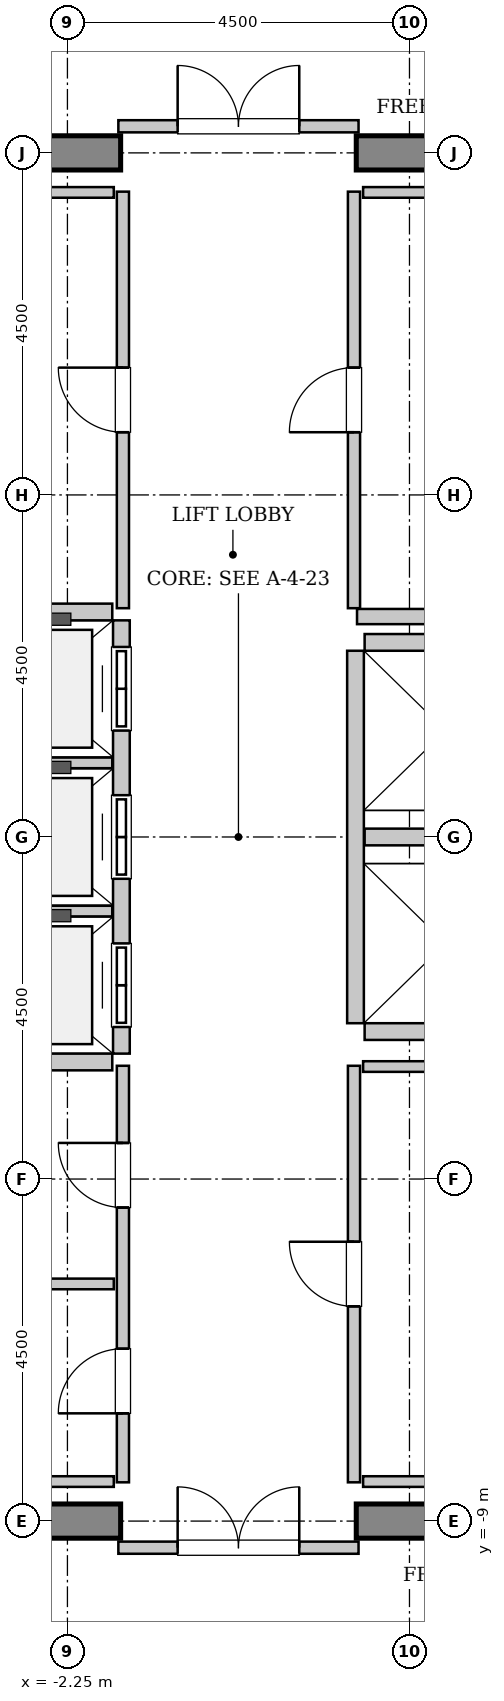
"""IFC4 building model, lengths in metres.
Left out: names, types, materials, properties, quantities, classifications, styles, units other than length and angle.
Written with IfcOpenShell. Run it as: python <this file> out.ifc"""

import sys

from ifc_helpers import new_model, si_unit, direction, frame, frame_2d, origin, place, context, subcontext, project, spatial, rectangle, extrude, source, transform, mapped, element, fill, save


model = new_model("IFC4")
c1 = context("Model", 3, precision=1e-05, world=origin(), true_north=direction((0.0, 1.0)))
c2 = subcontext(c1, "Body", "Model", "MODEL_VIEW")
j1 = project(units=[si_unit("LENGTHUNIT", "METRE"), si_unit("PLANEANGLEUNIT", "RADIAN")], contexts=[c1])
p1 = place(None, origin())
s1 = spatial("IfcSite", under=j1, at=p1, CompositionType="ELEMENT")
p2 = place(p1, origin())
s2 = spatial("IfcBuilding", under=s1, at=p2, CompositionType="ELEMENT")
p3 = place(p2, frame((0.0, 0.0, 276.0)))
s3 = spatial("IfcBuildingStorey", under=s2, at=p3, CompositionType="ELEMENT", Elevation=276.0)
m1 = source(origin(), c2, "Body", "SweptSolid", [
    extrude(rectangle(XDim=9.925, YDim=0.45, at=frame_2d((4.962, 0.0))), origin(), (0.0, 0.0, 1.0), 3.8),
])
for number, where, z_axis, x_axis in (
    (1, (-11.475, 9.0, 0.0), (0.0, 0.0, 1.0), (1.0, 0.0, 0.0)),
    (2, (1.55, 9.0, 0.0), (0.0, 0.0, 1.0), (1.0, 0.0, 0.0)),
    (3, (-11.475, -9.0, 0.0), (0.0, 0.0, 1.0), (1.0, 0.0, 0.0)),
    (4, (1.55, -9.0, 0.0), (0.0, 0.0, 1.0), (1.0, 0.0, 0.0)),
):
    element("IfcWall", number, at=place(p3, frame(where, z_axis=z_axis, x_axis=x_axis)), inside=s3, PredefinedType="SHEAR", context=c2, shape_type="MappedRepresentation", body=[
        mapped(m1, transform((0.0, 0.0, 0.0), x_axis=(1.0, 0.0, 0.0), y_axis=(0.0, 1.0, 0.0), z_axis=(0.0, 0.0, 1.0), scale=1.0)),
    ])
m2 = source(origin(), c2, "Body", "SweptSolid", [
    extrude(rectangle(XDim=5.7, YDim=0.22, at=frame_2d((2.85, 0.0))), origin(), (0.0, 0.0, 1.0), 3.535),
])
p4 = place(p3, frame((-1.54, -2.85, 0.0), z_axis=(0.0, 0.0, 1.0), x_axis=(0.0, 1.0, 0.0)))
e5 = element("IfcWall", 5, at=p4, inside=s3, PredefinedType="SOLIDWALL", context=c2, shape_type="MappedRepresentation", body=[
    mapped(m2, transform((0.0, 0.0, 0.0), x_axis=(1.0, 0.0, 0.0), y_axis=(0.0, 1.0, 0.0), z_axis=(0.0, 0.0, 1.0), scale=1.0)),
])
p5 = place(p4, frame((0.35, 0.0, 0.0)))
e6 = element("IfcOpeningElement", 6, at=p5, cuts=e5, PredefinedType="OPENING", context=c2, shape_type="SweptSolid", body=[
    extrude(rectangle(XDim=1.1, YDim=2.2, at=frame_2d((0.55, 1.1))), frame((0.0, 0.12, 0.0), z_axis=(0.0, -1.0, 0.0), x_axis=(1.0, 0.0, 0.0)), (0.0, 0.0, 1.0), 0.24),
])
p6 = place(p4, frame((2.3, 0.0, 0.0)))
e7 = element("IfcOpeningElement", 7, at=p6, cuts=e5, PredefinedType="OPENING", context=c2, shape_type="SweptSolid", body=[
    extrude(rectangle(XDim=1.1, YDim=2.2, at=frame_2d((0.55, 1.1))), frame((0.0, 0.12, 0.0), z_axis=(0.0, -1.0, 0.0), x_axis=(1.0, 0.0, 0.0)), (0.0, 0.0, 1.0), 0.24),
])
p7 = place(p4, frame((4.25, 0.0, 0.0)))
e8 = element("IfcOpeningElement", 8, at=p7, cuts=e5, PredefinedType="OPENING", context=c2, shape_type="SweptSolid", body=[
    extrude(rectangle(XDim=1.1, YDim=2.2, at=frame_2d((0.55, 1.1))), frame((0.0, 0.12, 0.0), z_axis=(0.0, -1.0, 0.0), x_axis=(1.0, 0.0, 0.0)), (0.0, 0.0, 1.0), 0.24),
])
m3 = source(origin(), c2, "Body", "SweptSolid", [
    extrude(rectangle(XDim=2.13, YDim=0.22, at=frame_2d((1.065, 0.0))), origin(), (0.0, 0.0, 1.0), 3.535),
])
p8 = place(p3, frame((-3.79, -2.96, 0.0), z_axis=(0.0, 0.0, 1.0), x_axis=(1.0, 0.0, 0.0)))
e9 = element("IfcWall", 9, at=p8, inside=s3, PredefinedType="SOLIDWALL", context=c2, shape_type="MappedRepresentation", body=[
    mapped(m3, transform((0.0, 0.0, 0.0), x_axis=(1.0, 0.0, 0.0), y_axis=(0.0, 1.0, 0.0), z_axis=(0.0, 0.0, 1.0), scale=1.0)),
])
m4 = source(origin(), c2, "Body", "SweptSolid", [
    extrude(rectangle(XDim=2.13, YDim=0.14, at=frame_2d((1.065, 0.0))), origin(), (0.0, 0.0, 1.0), 3.535),
])
for number, where, z_axis, x_axis in (
    (10, (-3.79, -0.975, 0.0), (0.0, 0.0, 1.0), (1.0, 0.0, 0.0)),
    (11, (-3.79, 0.975, 0.0), (0.0, 0.0, 1.0), (1.0, 0.0, 0.0)),
):
    element("IfcWall", number, at=place(p3, frame(where, z_axis=z_axis, x_axis=x_axis)), inside=s3, PredefinedType="PARTITIONING", context=c2, shape_type="MappedRepresentation", body=[
        mapped(m4, transform((0.0, 0.0, 0.0), x_axis=(1.0, 0.0, 0.0), y_axis=(0.0, 1.0, 0.0), z_axis=(0.0, 0.0, 1.0), scale=1.0)),
    ])
p9 = place(p3, frame((-1.66, 2.96, 0.0), z_axis=(0.0, 0.0, 1.0), x_axis=(-1.0, 0.0, 0.0)))
e12 = element("IfcWall", 12, at=p9, inside=s3, PredefinedType="SOLIDWALL", context=c2, shape_type="MappedRepresentation", body=[
    mapped(m3, transform((0.0, 0.0, 0.0), x_axis=(1.0, 0.0, 0.0), y_axis=(0.0, 1.0, 0.0), z_axis=(0.0, 0.0, 1.0), scale=1.0)),
])
m5 = source(origin(), c2, "Body", "SweptSolid", [
    extrude(rectangle(XDim=4.9, YDim=0.22, at=frame_2d((2.45, 0.0))), origin(), (0.0, 0.0, 1.0), 3.535),
])
p10 = place(p3, frame((1.54, 2.45, 0.0), z_axis=(0.0, 0.0, 1.0), x_axis=(0.0, -1.0, 0.0)))
e13 = element("IfcWall", 13, at=p10, inside=s3, PredefinedType="SOLIDWALL", context=c2, shape_type="MappedRepresentation", body=[
    mapped(m5, transform((0.0, 0.0, 0.0), x_axis=(1.0, 0.0, 0.0), y_axis=(0.0, 1.0, 0.0), z_axis=(0.0, 0.0, 1.0), scale=1.0)),
])
for number, where, z_axis, x_axis in (
    (14, (1.66, -2.56, 0.0), (0.0, 0.0, 1.0), (1.0, 0.0, 0.0)),
    (15, (1.66, 0.0, 0.0), (0.0, 0.0, 1.0), (1.0, 0.0, 0.0)),
    (16, (3.79, 2.56, 0.0), (0.0, 0.0, 1.0), (-1.0, 0.0, 0.0)),
):
    element("IfcWall", number, at=place(p3, frame(where, z_axis=z_axis, x_axis=x_axis)), inside=s3, PredefinedType="SOLIDWALL", context=c2, shape_type="MappedRepresentation", body=[
        mapped(m3, transform((0.0, 0.0, 0.0), x_axis=(1.0, 0.0, 0.0), y_axis=(0.0, 1.0, 0.0), z_axis=(0.0, 0.0, 1.0), scale=1.0)),
    ])
m6 = source(origin(), c2, "Body", "SweptSolid", [
    extrude(rectangle(XDim=2.52, YDim=0.2, at=frame_2d((1.26, 0.0))), origin(), (0.0, 0.0, 1.0), 3.535),
])
p11 = place(p3, frame((1.56, 2.9, 0.0), z_axis=(0.0, 0.0, 1.0), x_axis=(1.0, 0.0, 0.0)))
e17 = element("IfcWall", 17, at=p11, inside=s3, PredefinedType="PARTITIONING", context=c2, shape_type="MappedRepresentation", body=[
    mapped(m6, transform((0.0, 0.0, 0.0), x_axis=(1.0, 0.0, 0.0), y_axis=(0.0, 1.0, 0.0), z_axis=(0.0, 0.0, 1.0), scale=1.0)),
])
m7 = source(origin(), c2, "Body", "SweptSolid", [
    extrude(rectangle(XDim=3.16, YDim=0.16, at=frame_2d((1.58, 0.0))), origin(), (0.0, 0.0, 1.0), 2.625),
])
p12 = place(p3, frame((-1.58, 9.35, 0.0), z_axis=(0.0, 0.0, 1.0), x_axis=(1.0, 0.0, 0.0)))
e18 = element("IfcWall", 18, at=p12, inside=s3, PredefinedType="PARTITIONING", context=c2, shape_type="MappedRepresentation", body=[
    mapped(m7, transform((0.0, 0.0, 0.0), x_axis=(1.0, 0.0, 0.0), y_axis=(0.0, 1.0, 0.0), z_axis=(0.0, 0.0, 1.0), scale=1.0)),
])
p13 = place(p12, frame((0.78, 0.0, 0.0)))
e19 = element("IfcOpeningElement", 19, at=p13, cuts=e18, PredefinedType="OPENING", context=c2, shape_type="SweptSolid", body=[
    extrude(rectangle(XDim=1.6, YDim=2.3, at=frame_2d((0.8, 1.15))), frame((0.0, 0.09, 0.0), z_axis=(0.0, -1.0, 0.0), x_axis=(1.0, 0.0, 0.0)), (0.0, 0.0, 1.0), 0.18),
])
p14 = place(p3, frame((-1.58, -9.35, 0.0), z_axis=(0.0, 0.0, 1.0), x_axis=(1.0, 0.0, 0.0)))
e20 = element("IfcWall", 20, at=p14, inside=s3, PredefinedType="PARTITIONING", context=c2, shape_type="MappedRepresentation", body=[
    mapped(m7, transform((0.0, 0.0, 0.0), x_axis=(1.0, 0.0, 0.0), y_axis=(0.0, 1.0, 0.0), z_axis=(0.0, 0.0, 1.0), scale=1.0)),
])
p15 = place(p14, frame((0.78, 0.0, 0.0)))
e21 = element("IfcOpeningElement", 21, at=p15, cuts=e20, PredefinedType="OPENING", context=c2, shape_type="SweptSolid", body=[
    extrude(rectangle(XDim=1.6, YDim=2.3, at=frame_2d((0.8, 1.15))), frame((0.0, 0.09, 0.0), z_axis=(0.0, -1.0, 0.0), x_axis=(1.0, 0.0, 0.0)), (0.0, 0.0, 1.0), 0.18),
])
m8 = source(origin(), c2, "Body", "SweptSolid", [
    extrude(rectangle(XDim=5.48, YDim=0.16, at=frame_2d((2.74, 0.0))), origin(), (0.0, 0.0, 1.0), 3.535),
])
p16 = place(p3, frame((-1.52, 3.01, 0.0), z_axis=(0.0, 0.0, 1.0), x_axis=(0.0, 1.0, 0.0)))
e22 = element("IfcWall", 22, at=p16, inside=s3, PredefinedType="PARTITIONING", context=c2, shape_type="MappedRepresentation", body=[
    mapped(m8, transform((0.0, 0.0, 0.0), x_axis=(1.0, 0.0, 0.0), y_axis=(0.0, 1.0, 0.0), z_axis=(0.0, 0.0, 1.0), scale=1.0)),
])
p17 = place(p16, frame((2.315, 0.0, 0.0)))
e23 = element("IfcOpeningElement", 23, at=p17, cuts=e22, PredefinedType="OPENING", context=c2, shape_type="SweptSolid", body=[
    extrude(rectangle(XDim=0.85, YDim=2.1, at=frame_2d((0.425, 1.05))), frame((0.0, 0.09, 0.0), z_axis=(0.0, -1.0, 0.0), x_axis=(1.0, 0.0, 0.0)), (0.0, 0.0, 1.0), 0.18),
])
m9 = source(origin(), c2, "Body", "SweptSolid", [
    extrude(rectangle(XDim=3.15, YDim=0.14, at=frame_2d((1.575, 0.0))), origin(), (0.0, 0.0, 1.0), 3.535),
])
p18 = place(p3, frame((-4.79, 8.48, 0.0), z_axis=(0.0, 0.0, 1.0), x_axis=(1.0, 0.0, 0.0)))
e24 = element("IfcWall", 24, at=p18, inside=s3, PredefinedType="PARTITIONING", context=c2, shape_type="MappedRepresentation", body=[
    mapped(m9, transform((0.0, 0.0, 0.0), x_axis=(1.0, 0.0, 0.0), y_axis=(0.0, 1.0, 0.0), z_axis=(0.0, 0.0, 1.0), scale=1.0)),
])
p19 = place(p3, frame((-1.52, -8.49, 0.0), z_axis=(0.0, 0.0, 1.0), x_axis=(0.0, 1.0, 0.0)))
e25 = element("IfcWall", 25, at=p19, inside=s3, PredefinedType="PARTITIONING", context=c2, shape_type="MappedRepresentation", body=[
    mapped(m8, transform((0.0, 0.0, 0.0), x_axis=(1.0, 0.0, 0.0), y_axis=(0.0, 1.0, 0.0), z_axis=(0.0, 0.0, 1.0), scale=1.0)),
])
p20 = place(p19, frame((0.907, 0.0, 0.0)))
e26 = element("IfcOpeningElement", 26, at=p20, cuts=e25, PredefinedType="OPENING", context=c2, shape_type="SweptSolid", body=[
    extrude(rectangle(XDim=0.85, YDim=2.1, at=frame_2d((0.425, 1.05))), frame((0.0, 0.09, 0.0), z_axis=(0.0, -1.0, 0.0), x_axis=(1.0, 0.0, 0.0)), (0.0, 0.0, 1.0), 0.18),
])
p21 = place(p19, frame((3.615, 0.0, 0.0)))
e27 = element("IfcOpeningElement", 27, at=p21, cuts=e25, PredefinedType="OPENING", context=c2, shape_type="SweptSolid", body=[
    extrude(rectangle(XDim=0.85, YDim=2.1, at=frame_2d((0.425, 1.05))), frame((0.0, 0.09, 0.0), z_axis=(0.0, -1.0, 0.0), x_axis=(1.0, 0.0, 0.0)), (0.0, 0.0, 1.0), 0.18),
])
m10 = source(origin(), c2, "Body", "SweptSolid", [
    extrude(rectangle(XDim=5.55, YDim=0.14, at=frame_2d((2.775, 0.0))), origin(), (0.0, 0.0, 1.0), 3.535),
])
p22 = place(p3, frame((-7.19, -5.88, 0.0), z_axis=(0.0, 0.0, 1.0), x_axis=(1.0, 0.0, 0.0)))
e28 = element("IfcWall", 28, at=p22, inside=s3, PredefinedType="PARTITIONING", context=c2, shape_type="MappedRepresentation", body=[
    mapped(m10, transform((0.0, 0.0, 0.0), x_axis=(1.0, 0.0, 0.0), y_axis=(0.0, 1.0, 0.0), z_axis=(0.0, 0.0, 1.0), scale=1.0)),
])
p23 = place(p3, frame((1.52, 3.01, 0.0), z_axis=(0.0, 0.0, 1.0), x_axis=(0.0, 1.0, 0.0)))
e29 = element("IfcWall", 29, at=p23, inside=s3, PredefinedType="PARTITIONING", context=c2, shape_type="MappedRepresentation", body=[
    mapped(m8, transform((0.0, 0.0, 0.0), x_axis=(1.0, 0.0, 0.0), y_axis=(0.0, 1.0, 0.0), z_axis=(0.0, 0.0, 1.0), scale=1.0)),
])
p24 = place(p23, frame((2.315, 0.0, 0.0)))
e30 = element("IfcOpeningElement", 30, at=p24, cuts=e29, PredefinedType="OPENING", context=c2, shape_type="SweptSolid", body=[
    extrude(rectangle(XDim=0.85, YDim=2.1, at=frame_2d((0.425, 1.05))), frame((0.0, 0.09, 0.0), z_axis=(0.0, -1.0, 0.0), x_axis=(1.0, 0.0, 0.0)), (0.0, 0.0, 1.0), 0.18),
])
for number, where, z_axis, x_axis in (
    (31, (1.64, 8.48, 0.0), (0.0, 0.0, 1.0), (1.0, 0.0, 0.0)),
    (32, (-4.79, -8.48, 0.0), (0.0, 0.0, 1.0), (1.0, 0.0, 0.0)),
):
    element("IfcWall", number, at=place(p3, frame(where, z_axis=z_axis, x_axis=x_axis)), inside=s3, PredefinedType="PARTITIONING", context=c2, shape_type="MappedRepresentation", body=[
        mapped(m9, transform((0.0, 0.0, 0.0), x_axis=(1.0, 0.0, 0.0), y_axis=(0.0, 1.0, 0.0), z_axis=(0.0, 0.0, 1.0), scale=1.0)),
    ])
p25 = place(p3, frame((1.52, -8.49, 0.0), z_axis=(0.0, 0.0, 1.0), x_axis=(0.0, 1.0, 0.0)))
e33 = element("IfcWall", 33, at=p25, inside=s3, PredefinedType="PARTITIONING", context=c2, shape_type="MappedRepresentation", body=[
    mapped(m8, transform((0.0, 0.0, 0.0), x_axis=(1.0, 0.0, 0.0), y_axis=(0.0, 1.0, 0.0), z_axis=(0.0, 0.0, 1.0), scale=1.0)),
])
p26 = place(p25, frame((2.315, 0.0, 0.0)))
e34 = element("IfcOpeningElement", 34, at=p26, cuts=e33, PredefinedType="OPENING", context=c2, shape_type="SweptSolid", body=[
    extrude(rectangle(XDim=0.85, YDim=2.1, at=frame_2d((0.425, 1.05))), frame((0.0, 0.09, 0.0), z_axis=(0.0, -1.0, 0.0), x_axis=(1.0, 0.0, 0.0)), (0.0, 0.0, 1.0), 0.18),
])
for number, where, z_axis, x_axis in (
    (35, (1.64, -3.02, 0.0), (0.0, 0.0, 1.0), (1.0, 0.0, 0.0)),
    (36, (1.64, -8.48, 0.0), (0.0, 0.0, 1.0), (1.0, 0.0, 0.0)),
):
    element("IfcWall", number, at=place(p3, frame(where, z_axis=z_axis, x_axis=x_axis)), inside=s3, PredefinedType="PARTITIONING", context=c2, shape_type="MappedRepresentation", body=[
        mapped(m9, transform((0.0, 0.0, 0.0), x_axis=(1.0, 0.0, 0.0), y_axis=(0.0, 1.0, 0.0), z_axis=(0.0, 0.0, 1.0), scale=1.0)),
    ])
m11 = source(origin(), c2, "Body", "SweptSolid", [
    extrude(rectangle(XDim=1.1, YDim=2.2, at=frame_2d((0.55, 1.1))), frame((0.0, 0.025, 0.0), z_axis=(0.0, -1.0, 0.0), x_axis=(1.0, 0.0, 0.0)), (0.0, 0.0, 1.0), 0.05),
])
p27 = place(p5, origin())
e37 = element("IfcDoor", 37, at=p27, inside=s3, OperationType="DOUBLE_DOOR_SLIDING", PredefinedType="DOOR", context=c2, shape_type="MappedRepresentation", body=[
    mapped(m11, transform((0.0, 0.0, 0.0), x_axis=(1.0, 0.0, 0.0), y_axis=(0.0, 1.0, 0.0), z_axis=(0.0, 0.0, 1.0), scale=1.0)),
])
fill(e6, e37)
p28 = place(p6, origin())
e38 = element("IfcDoor", 38, at=p28, inside=s3, OperationType="DOUBLE_DOOR_SLIDING", PredefinedType="DOOR", context=c2, shape_type="MappedRepresentation", body=[
    mapped(m11, transform((0.0, 0.0, 0.0), x_axis=(1.0, 0.0, 0.0), y_axis=(0.0, 1.0, 0.0), z_axis=(0.0, 0.0, 1.0), scale=1.0)),
])
fill(e7, e38)
p29 = place(p7, origin())
e39 = element("IfcDoor", 39, at=p29, inside=s3, OperationType="DOUBLE_DOOR_SLIDING", PredefinedType="DOOR", context=c2, shape_type="MappedRepresentation", body=[
    mapped(m11, transform((0.0, 0.0, 0.0), x_axis=(1.0, 0.0, 0.0), y_axis=(0.0, 1.0, 0.0), z_axis=(0.0, 0.0, 1.0), scale=1.0)),
])
fill(e8, e39)
m12 = source(origin(), c2, "Body", "SweptSolid", [
    extrude(rectangle(XDim=1.6, YDim=2.3, at=frame_2d((0.8, 1.15))), frame((0.0, 0.025, 0.0), z_axis=(0.0, -1.0, 0.0), x_axis=(1.0, 0.0, 0.0)), (0.0, 0.0, 1.0), 0.05),
])
p30 = place(p13, origin())
e40 = element("IfcDoor", 40, at=p30, inside=s3, OperationType="DOUBLE_DOOR_SINGLE_SWING", PredefinedType="DOOR", context=c2, shape_type="MappedRepresentation", body=[
    mapped(m12, transform((0.0, 0.0, 0.0), x_axis=(1.0, 0.0, 0.0), y_axis=(0.0, 1.0, 0.0), z_axis=(0.0, 0.0, 1.0), scale=1.0)),
])
fill(e19, e40)
p31 = place(p15, origin())
e41 = element("IfcDoor", 41, at=p31, inside=s3, OperationType="DOUBLE_DOOR_SINGLE_SWING", PredefinedType="DOOR", context=c2, shape_type="MappedRepresentation", body=[
    mapped(m12, transform((0.0, 0.0, 0.0), x_axis=(1.0, 0.0, 0.0), y_axis=(0.0, 1.0, 0.0), z_axis=(0.0, 0.0, 1.0), scale=1.0)),
])
fill(e21, e41)
m13 = source(origin(), c2, "Body", "SweptSolid", [
    extrude(rectangle(XDim=0.85, YDim=2.1, at=frame_2d((0.425, 1.05))), frame((0.0, 0.025, 0.0), z_axis=(0.0, -1.0, 0.0), x_axis=(1.0, 0.0, 0.0)), (0.0, 0.0, 1.0), 0.05),
])
p32 = place(p17, origin())
e42 = element("IfcDoor", 42, at=p32, inside=s3, OperationType="SINGLE_SWING_RIGHT", PredefinedType="DOOR", context=c2, shape_type="MappedRepresentation", body=[
    mapped(m13, transform((0.0, 0.0, 0.0), x_axis=(1.0, 0.0, 0.0), y_axis=(0.0, 1.0, 0.0), z_axis=(0.0, 0.0, 1.0), scale=1.0)),
])
fill(e23, e42)
p33 = place(p20, origin())
e43 = element("IfcDoor", 43, at=p33, inside=s3, OperationType="SINGLE_SWING_LEFT", PredefinedType="DOOR", context=c2, shape_type="MappedRepresentation", body=[
    mapped(m13, transform((0.0, 0.0, 0.0), x_axis=(1.0, 0.0, 0.0), y_axis=(0.0, 1.0, 0.0), z_axis=(0.0, 0.0, 1.0), scale=1.0)),
])
fill(e26, e43)
p34 = place(p21, origin())
e44 = element("IfcDoor", 44, at=p34, inside=s3, OperationType="SINGLE_SWING_RIGHT", PredefinedType="DOOR", context=c2, shape_type="MappedRepresentation", body=[
    mapped(m13, transform((0.0, 0.0, 0.0), x_axis=(1.0, 0.0, 0.0), y_axis=(0.0, 1.0, 0.0), z_axis=(0.0, 0.0, 1.0), scale=1.0)),
])
fill(e27, e44)
p35 = place(p24, origin())
e45 = element("IfcDoor", 45, at=p35, inside=s3, OperationType="SINGLE_SWING_LEFT", PredefinedType="DOOR", context=c2, shape_type="MappedRepresentation", body=[
    mapped(m13, transform((0.0, 0.0, 0.0), x_axis=(1.0, 0.0, 0.0), y_axis=(0.0, 1.0, 0.0), z_axis=(0.0, 0.0, 1.0), scale=1.0)),
])
fill(e30, e45)
p36 = place(p26, origin())
e46 = element("IfcDoor", 46, at=p36, inside=s3, OperationType="SINGLE_SWING_RIGHT", PredefinedType="DOOR", context=c2, shape_type="MappedRepresentation", body=[
    mapped(m13, transform((0.0, 0.0, 0.0), x_axis=(1.0, 0.0, 0.0), y_axis=(0.0, 1.0, 0.0), z_axis=(0.0, 0.0, 1.0), scale=1.0)),
])
fill(e34, e46)
save(model, sys.argv[1])
